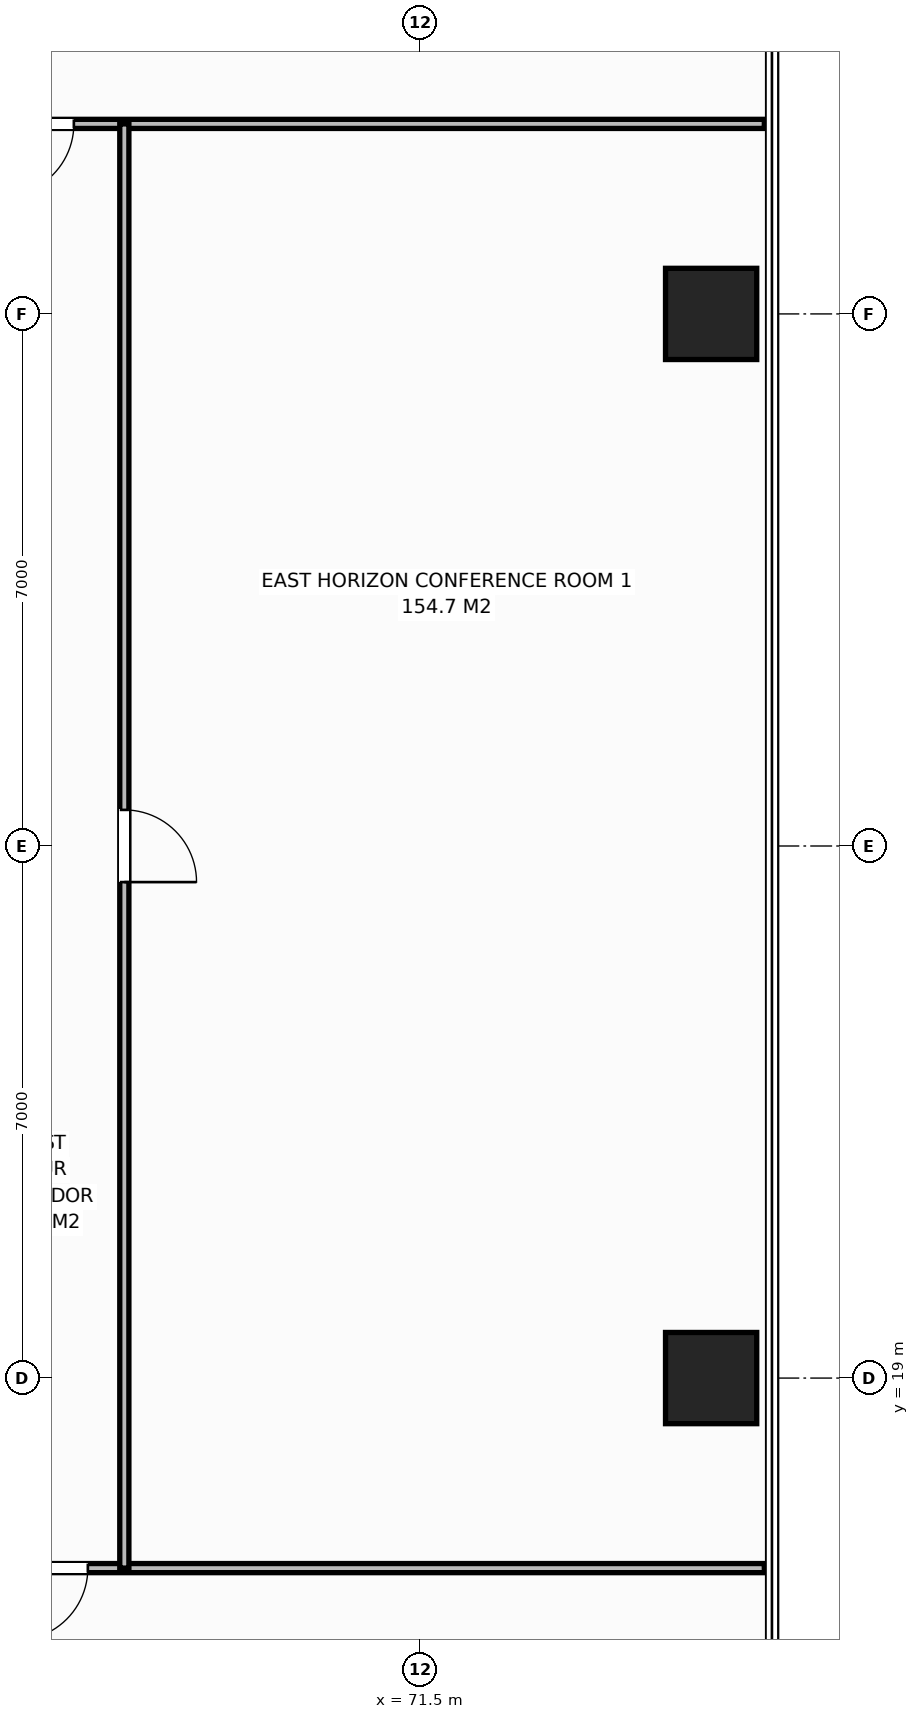
"""IFC4 building model, lengths in metres.
Left out: names, types, materials, properties, quantities, classifications, styles, units other than length and angle.
Written with IfcOpenShell. Run it as: python <this file> out.ifc"""

import sys

from ifc_helpers import new_model, si_unit, direction, frame, frame_2d, origin, origin_2d, place, context, subcontext, project, spatial, rectangle, extrude, element, fill, save


model = new_model("IFC4")
c1 = context("Model", 3, precision=1e-05, world=origin(), true_north=direction((0.0, 1.0)))
c2 = subcontext(c1, "Body", "Model", "MODEL_VIEW")
j1 = project(units=[si_unit("LENGTHUNIT", "METRE"), si_unit("PLANEANGLEUNIT", "RADIAN")], contexts=[c1])
p1 = place(None, origin())
s1 = spatial("IfcSite", under=j1, at=p1, CompositionType="ELEMENT")
p2 = place(p1, origin())
s2 = spatial("IfcBuilding", under=s1, at=p2, CompositionType="ELEMENT")
p3 = place(p2, frame((0.0, 0.0, 116.4)))
s3 = spatial("IfcBuildingStorey", under=s2, at=p3, CompositionType="ELEMENT", Elevation=116.4)
for number, where, z_axis, x_axis in (
    (1, (75.32, 19.0, 0.0), (0.0, 0.0, 1.0), (1.0, 0.0, 0.0)),
    (2, (75.32, 33.0, 0.0), (0.0, 0.0, 1.0), (1.0, 0.0, 0.0)),
):
    element("IfcColumn", number, at=place(p3, frame(where, z_axis=z_axis, x_axis=x_axis)), inside=s3, PredefinedType="COLUMN", context=c2, shape_type="SweptSolid", body=[
        extrude(rectangle(XDim=1.2, YDim=1.2, at=origin_2d()), origin(), (0.0, 0.0, 1.0), 3.8),
    ])
p4 = place(p3, frame((65.322, 35.5, 0.0), z_axis=(0.0, 0.0, 1.0), x_axis=(1.0, 0.0, 0.0)))
e3 = element("IfcWall", 3, at=p4, inside=s3, PredefinedType="PARTITIONING", context=c2, shape_type="SweptSolid", body=[
    extrude(rectangle(XDim=10.698, YDim=0.12, at=frame_2d((5.349, 0.0))), origin(), (0.0, 0.0, 1.0), 3.565),
])
p5 = place(p4, frame((0.664, 0.0, 0.0)))
e4 = element("IfcOpeningElement", 4, at=p5, cuts=e3, PredefinedType="OPENING", context=c2, shape_type="SweptSolid", body=[
    extrude(rectangle(XDim=0.95, YDim=2.15, at=frame_2d((0.475, 1.075))), frame((0.0, 0.07, 0.0), z_axis=(0.0, -1.0, 0.0), x_axis=(1.0, 0.0, 0.0)), (0.0, 0.0, 1.0), 0.14),
])
p6 = place(p3, frame((63.955, 16.5, 0.0), z_axis=(0.0, 0.0, 1.0), x_axis=(1.0, 0.0, 0.0)))
e5 = element("IfcWall", 5, at=p6, inside=s3, PredefinedType="PARTITIONING", context=c2, shape_type="SweptSolid", body=[
    extrude(rectangle(XDim=12.065, YDim=0.12, at=frame_2d((6.033, 0.0))), origin(), (0.0, 0.0, 1.0), 3.565),
])
p7 = place(p6, frame((2.215, 0.0, 0.0)))
e6 = element("IfcOpeningElement", 6, at=p7, cuts=e5, PredefinedType="OPENING", context=c2, shape_type="SweptSolid", body=[
    extrude(rectangle(XDim=0.95, YDim=2.15, at=frame_2d((0.475, 1.075))), frame((0.0, 0.07, 0.0), z_axis=(0.0, -1.0, 0.0), x_axis=(1.0, 0.0, 0.0)), (0.0, 0.0, 1.0), 0.14),
])
p8 = place(p3, frame((67.6, 16.5, 0.0), z_axis=(0.0, 0.0, 1.0), x_axis=(0.0, 1.0, 0.0)))
e7 = element("IfcWall", 7, at=p8, inside=s3, PredefinedType="PARTITIONING", context=c2, shape_type="SweptSolid", body=[
    extrude(rectangle(XDim=19.0, YDim=0.12, at=frame_2d((9.5, 0.0))), origin(), (0.0, 0.0, 1.0), 3.565),
])
p9 = place(p8, frame((9.025, 0.0, 0.0)))
e8 = element("IfcOpeningElement", 8, at=p9, cuts=e7, PredefinedType="OPENING", context=c2, shape_type="SweptSolid", body=[
    extrude(rectangle(XDim=0.95, YDim=2.15, at=frame_2d((0.475, 1.075))), frame((0.0, 0.07, 0.0), z_axis=(0.0, -1.0, 0.0), x_axis=(1.0, 0.0, 0.0)), (0.0, 0.0, 1.0), 0.14),
])
p10 = place(p5, origin())
e9 = element("IfcDoor", 9, at=p10, inside=s3, OperationType="SINGLE_SWING_RIGHT", PredefinedType="DOOR", context=c2, shape_type="SweptSolid", body=[
    extrude(rectangle(XDim=0.95, YDim=2.15, at=frame_2d((0.475, 1.075))), frame((0.0, 0.025, 0.0), z_axis=(0.0, -1.0, 0.0), x_axis=(1.0, 0.0, 0.0)), (0.0, 0.0, 1.0), 0.05),
])
fill(e4, e9)
p11 = place(p7, origin())
e10 = element("IfcDoor", 10, at=p11, inside=s3, OperationType="SINGLE_SWING_RIGHT", PredefinedType="DOOR", context=c2, shape_type="SweptSolid", body=[
    extrude(rectangle(XDim=0.95, YDim=2.15, at=frame_2d((0.475, 1.075))), frame((0.0, 0.025, 0.0), z_axis=(0.0, -1.0, 0.0), x_axis=(1.0, 0.0, 0.0)), (0.0, 0.0, 1.0), 0.05),
])
fill(e6, e10)
p12 = place(p9, origin())
e11 = element("IfcDoor", 11, at=p12, inside=s3, OperationType="SINGLE_SWING_RIGHT", PredefinedType="DOOR", context=c2, shape_type="SweptSolid", body=[
    extrude(rectangle(XDim=0.95, YDim=2.15, at=frame_2d((0.475, 1.075))), frame((0.0, 0.025, 0.0), z_axis=(0.0, -1.0, 0.0), x_axis=(1.0, 0.0, 0.0)), (0.0, 0.0, 1.0), 0.05),
])
fill(e8, e11)
save(model, sys.argv[1])
